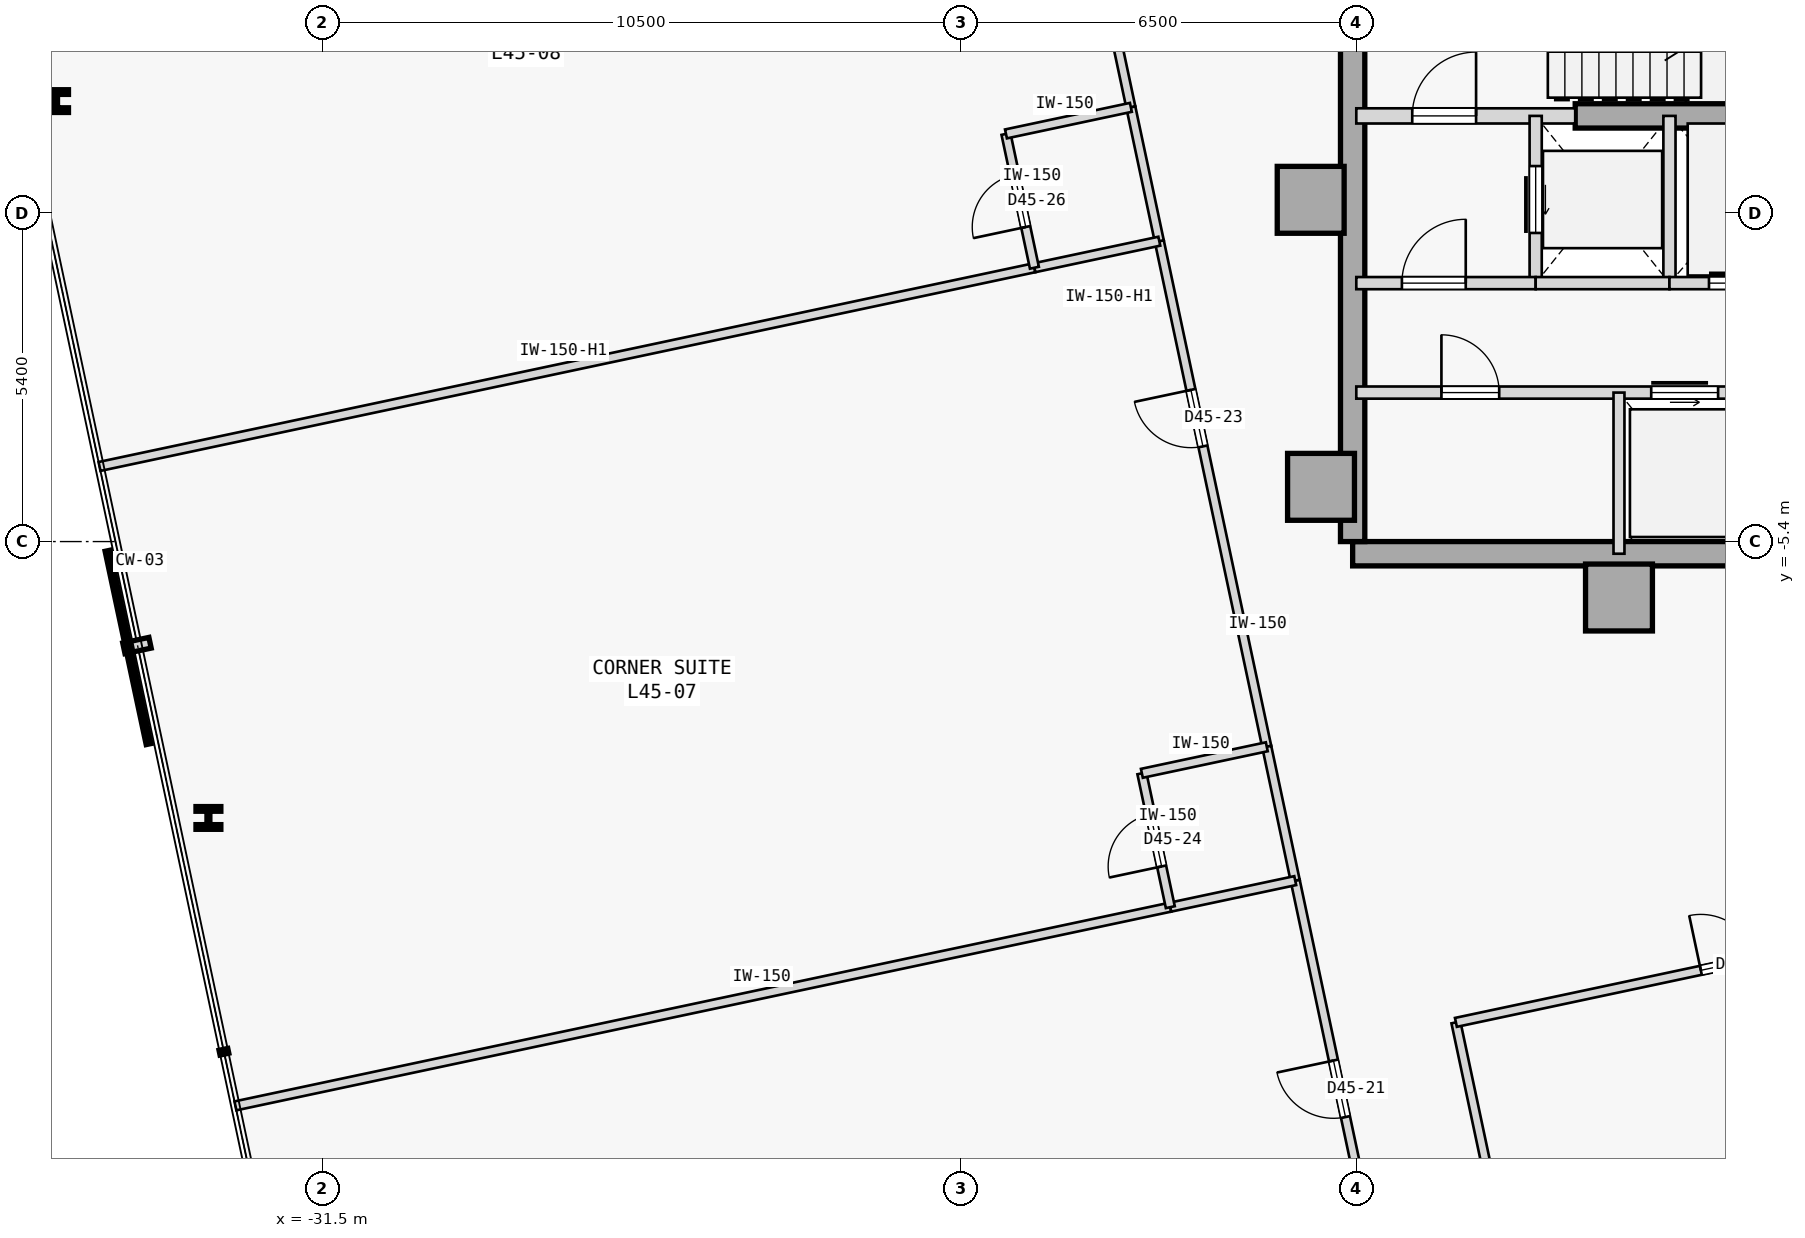
"""IFC4 building model, lengths in metres.
Left out: names, types, materials, properties, quantities, classifications, styles, units other than length and angle.
Written with IfcOpenShell. Run it as: python <this file> out.ifc"""

import sys

from ifc_helpers import new_model, si_unit, direction, frame, frame_2d, origin, origin_2d, place, context, subcontext, project, spatial, rectangle, i_section, extrude, element, fill, save


model = new_model("IFC4")
c1 = context("Model", 3, precision=1e-05, world=origin(), true_north=direction((0.0, 1.0)))
c2 = subcontext(c1, "Body", "Model", "MODEL_VIEW")
j1 = project(units=[si_unit("LENGTHUNIT", "METRE"), si_unit("PLANEANGLEUNIT", "RADIAN")], contexts=[c1])
p1 = place(None, origin())
s1 = spatial("IfcSite", under=j1, at=p1, CompositionType="ELEMENT")
p2 = place(p1, origin())
s2 = spatial("IfcBuilding", under=s1, at=p2, CompositionType="ELEMENT")
p3 = place(p2, frame((0.0, 0.0, 175.2)))
s3 = spatial("IfcBuildingStorey", under=s2, at=p3, CompositionType="ELEMENT", Elevation=175.2)
for number, where, z_axis, x_axis in (
    (1, (-15.25, 0.22, 0.0), (0.0, 0.0, 1.0), (1.0, 0.0, 0.0)),
    (2, (-15.08, -4.5, 0.0), (0.0, 0.0, 1.0), (1.0, 0.0, 0.0)),
    (3, (-10.18, -6.32, 0.0), (0.0, 0.0, 1.0), (1.0, 0.0, 0.0)),
):
    element("IfcColumn", number, at=place(p3, frame(where, z_axis=z_axis, x_axis=x_axis)), inside=s3, PredefinedType="COLUMN", context=c2, shape_type="SweptSolid", body=[
        extrude(rectangle(XDim=1.1, YDim=1.1, at=origin_2d()), origin(), (0.0, 0.0, 1.0), 3.4),
    ])
p4 = place(p3, frame((-14.56, -5.6, 0.0), z_axis=(0.0, 0.0, 1.0), x_axis=(1.0, 0.0, 0.0)))
e4 = element("IfcWall", 4, at=p4, inside=s3, PredefinedType="SHEAR", context=c2, shape_type="SweptSolid", body=[
    extrude(rectangle(XDim=10.86, YDim=0.4, at=frame_2d((5.43, 0.0))), origin(), (0.0, 0.0, 1.0), 3.175),
])
p5 = place(p3, frame((-14.56, -5.4, 0.0), z_axis=(0.0, 0.0, 1.0), x_axis=(0.0, 1.0, 0.0)))
e5 = element("IfcWall", 5, at=p5, inside=s3, PredefinedType="SHEAR", context=c2, shape_type="SweptSolid", body=[
    extrude(rectangle(XDim=10.8, YDim=0.4, at=frame_2d((5.4, 0.0))), origin(), (0.0, 0.0, 1.0), 3.175),
])
p6 = place(p3, frame((-10.9, 1.6, 0.0), z_axis=(0.0, 0.0, 1.0), x_axis=(1.0, 0.0, 0.0)))
e6 = element("IfcWall", 6, at=p6, inside=s3, PredefinedType="SHEAR", context=c2, shape_type="SweptSolid", body=[
    extrude(rectangle(XDim=5.15, YDim=0.4, at=frame_2d((2.575, 0.0))), origin(), (0.0, 0.0, 1.0), 3.175),
])
for number, where, z_axis, x_axis in (
    (7, (-35.883, 1.844, 0.0), (0.0, 0.0, 1.0), (1.0, 0.0, 0.0)),
    (8, (-33.377, -9.945, 0.0), (0.0, 0.0, 1.0), (1.0, 0.0, 0.0)),
):
    element("IfcColumn", number, at=place(p3, frame(where, z_axis=z_axis, x_axis=x_axis)), inside=s3, PredefinedType="COLUMN", context=c2, shape_type="SweptSolid", body=[
        extrude(i_section(OverallWidth=0.409, OverallDepth=0.374, WebThickness=0.048, FlangeThickness=0.077, FilletRadius=0.015, at=origin_2d()), origin(), (0.0, 0.0, 1.0), 3.4),
    ])
p7 = place(p3, frame((-14.5, 1.6, 0.0), z_axis=(0.0, 0.0, 1.0), x_axis=(1.0, 0.0, 0.0)))
e9 = element("IfcWall", 9, at=p7, inside=s3, PredefinedType="STANDARD", context=c2, shape_type="SweptSolid", body=[
    extrude(rectangle(XDim=3.6, YDim=0.25, at=frame_2d((1.8, 0.0))), origin(), (0.0, 0.0, 1.0), 3.175),
])
p8 = place(p7, frame((0.92, 0.0, 0.0)))
e10 = element("IfcOpeningElement", 10, at=p8, cuts=e9, PredefinedType="OPENING", context=c2, shape_type="SweptSolid", body=[
    extrude(rectangle(XDim=1.05, YDim=2.15, at=frame_2d((0.525, 1.075))), frame((0.0, 0.135, 0.0), z_axis=(0.0, -1.0, 0.0), x_axis=(1.0, 0.0, 0.0)), (0.0, 0.0, 1.0), 0.27),
])
p9 = place(p3, frame((-11.55, -1.15, 0.0), z_axis=(0.0, 0.0, 1.0), x_axis=(0.0, 1.0, 0.0)))
e11 = element("IfcWall", 11, at=p9, inside=s3, PredefinedType="STANDARD", context=c2, shape_type="SweptSolid", body=[
    extrude(rectangle(XDim=2.75, YDim=0.2, at=frame_2d((1.375, 0.0))), origin(), (0.0, 0.0, 1.0), 3.175),
])
p10 = place(p9, frame((0.825, 0.0, 0.0)))
e12 = element("IfcOpeningElement", 12, at=p10, cuts=e11, PredefinedType="OPENING", context=c2, shape_type="SweptSolid", body=[
    extrude(rectangle(XDim=1.1, YDim=2.15, at=frame_2d((0.55, 1.075))), frame((0.0, 0.11, 0.0), z_axis=(0.0, -1.0, 0.0), x_axis=(1.0, 0.0, 0.0)), (0.0, 0.0, 1.0), 0.22),
])
p11 = place(p3, frame((-9.35, -1.15, 0.0), z_axis=(0.0, 0.0, 1.0), x_axis=(0.0, 1.0, 0.0)))
e13 = element("IfcWall", 13, at=p11, inside=s3, PredefinedType="STANDARD", context=c2, shape_type="SweptSolid", body=[
    extrude(rectangle(XDim=2.75, YDim=0.2, at=frame_2d((1.375, 0.0))), origin(), (0.0, 0.0, 1.0), 3.175),
])
p12 = place(p3, frame((-14.5, -1.15, 0.0), z_axis=(0.0, 0.0, 1.0), x_axis=(1.0, 0.0, 0.0)))
e14 = element("IfcWall", 14, at=p12, inside=s3, PredefinedType="STANDARD", context=c2, shape_type="SweptSolid", body=[
    extrude(rectangle(XDim=2.95, YDim=0.2, at=frame_2d((1.475, 0.0))), origin(), (0.0, 0.0, 1.0), 3.175),
])
p13 = place(p12, frame((0.75, 0.0, 0.0)))
e15 = element("IfcOpeningElement", 15, at=p13, cuts=e14, PredefinedType="OPENING", context=c2, shape_type="SweptSolid", body=[
    extrude(rectangle(XDim=1.05, YDim=2.18, at=frame_2d((0.525, 1.09))), frame((0.0, 0.11, 0.0), z_axis=(0.0, -1.0, 0.0), x_axis=(1.0, 0.0, 0.0)), (0.0, 0.0, 1.0), 0.22),
])
p14 = place(p3, frame((-11.55, -1.15, 0.0), z_axis=(0.0, 0.0, 1.0), x_axis=(1.0, 0.0, 0.0)))
e16 = element("IfcWall", 16, at=p14, inside=s3, PredefinedType="STANDARD", context=c2, shape_type="SweptSolid", body=[
    extrude(rectangle(XDim=2.2, YDim=0.2, at=frame_2d((1.1, 0.0))), origin(), (0.0, 0.0, 1.0), 3.175),
])
p15 = place(p3, frame((-9.35, -1.15, 0.0), z_axis=(0.0, 0.0, 1.0), x_axis=(1.0, 0.0, 0.0)))
e17 = element("IfcWall", 17, at=p15, inside=s3, PredefinedType="STANDARD", context=c2, shape_type="SweptSolid", body=[
    extrude(rectangle(XDim=2.4, YDim=0.2, at=frame_2d((1.2, 0.0))), origin(), (0.0, 0.0, 1.0), 3.175),
])
p16 = place(p15, frame((0.65, 0.0, 0.0)))
e18 = element("IfcOpeningElement", 18, at=p16, cuts=e17, PredefinedType="OPENING", context=c2, shape_type="SweptSolid", body=[
    extrude(rectangle(XDim=1.1, YDim=2.15, at=frame_2d((0.55, 1.075))), frame((0.0, 0.11, 0.0), z_axis=(0.0, -1.0, 0.0), x_axis=(1.0, 0.0, 0.0)), (0.0, 0.0, 1.0), 0.22),
])
p17 = place(p3, frame((-14.5, -2.95, 0.0), z_axis=(0.0, 0.0, 1.0), x_axis=(1.0, 0.0, 0.0)))
e19 = element("IfcWall", 19, at=p17, inside=s3, PredefinedType="STANDARD", context=c2, shape_type="SweptSolid", body=[
    extrude(rectangle(XDim=10.8, YDim=0.2, at=frame_2d((5.4, 0.0))), origin(), (0.0, 0.0, 1.0), 3.175),
])
p18 = place(p17, frame((4.85, 0.0, 0.0)))
e20 = element("IfcOpeningElement", 20, at=p18, cuts=e19, PredefinedType="OPENING", context=c2, shape_type="SweptSolid", body=[
    extrude(rectangle(XDim=1.1, YDim=2.15, at=frame_2d((0.55, 1.075))), frame((0.0, 0.11, 0.0), z_axis=(0.0, -1.0, 0.0), x_axis=(1.0, 0.0, 0.0)), (0.0, 0.0, 1.0), 0.22),
])
p19 = place(p17, frame((7.01, 0.0, 0.0)))
e21 = element("IfcOpeningElement", 21, at=p19, cuts=e19, PredefinedType="OPENING", context=c2, shape_type="SweptSolid", body=[
    extrude(rectangle(XDim=1.1, YDim=2.15, at=frame_2d((0.55, 1.075))), frame((0.0, 0.11, 0.0), z_axis=(0.0, -1.0, 0.0), x_axis=(1.0, 0.0, 0.0)), (0.0, 0.0, 1.0), 0.22),
])
p20 = place(p17, frame((1.4, 0.0, 0.0)))
e22 = element("IfcOpeningElement", 22, at=p20, cuts=e19, PredefinedType="OPENING", context=c2, shape_type="SweptSolid", body=[
    extrude(rectangle(XDim=0.95, YDim=2.15, at=frame_2d((0.475, 1.075))), frame((0.0, 0.11, 0.0), z_axis=(0.0, -1.0, 0.0), x_axis=(1.0, 0.0, 0.0)), (0.0, 0.0, 1.0), 0.22),
])
p21 = place(p3, frame((-10.18, -5.6, 0.0), z_axis=(0.0, 0.0, 1.0), x_axis=(0.0, 1.0, 0.0)))
e23 = element("IfcWall", 23, at=p21, inside=s3, PredefinedType="STANDARD", context=c2, shape_type="SweptSolid", body=[
    extrude(rectangle(XDim=2.65, YDim=0.18, at=frame_2d((1.325, 0.0))), origin(), (0.0, 0.0, 1.0), 3.175),
])
p22 = place(p3, frame((-11.465, -19.88, 0.0), z_axis=(0.0, 0.0, 1.0), x_axis=(-0.207916109912, 0.978146661416, 0.0)))
e24 = element("IfcWall", 24, at=p22, inside=s3, PredefinedType="PARTITIONING", context=c2, shape_type="SweptSolid", body=[
    extrude(rectangle(XDim=6.72, YDim=0.15, at=frame_2d((3.36, 0.0))), origin(), (0.0, 0.0, 1.0), 3.175),
])
p23 = place(p3, frame((-12.862, -13.307, 0.0), z_axis=(0.0, 0.0, 1.0), x_axis=(0.978149904805, 0.207900850719, 0.0)))
e25 = element("IfcWall", 25, at=p23, inside=s3, PredefinedType="PARTITIONING", context=c2, shape_type="SweptSolid", body=[
    extrude(rectangle(XDim=9.156, YDim=0.15, at=frame_2d((4.578, 0.0))), origin(), (0.0, 0.0, 1.0), 3.175),
])
p24 = place(p23, frame((4.118, 0.0, 0.0)))
e26 = element("IfcOpeningElement", 26, at=p24, cuts=e25, PredefinedType="OPENING", context=c2, shape_type="SweptSolid", body=[
    extrude(rectangle(XDim=0.92, YDim=2.15, at=frame_2d((0.46, 1.075))), frame((0.0, 0.085, 0.0), z_axis=(0.0, -1.0, 0.0), x_axis=(1.0, 0.0, 0.0)), (0.0, 0.0, 1.0), 0.17),
])
p25 = place(p3, frame((-14.049, -17.823, 0.0), z_axis=(0.0, 0.0, 1.0), x_axis=(-0.207940096132, 0.978141562567, 0.0)))
e27 = element("IfcWall", 27, at=p25, inside=s3, PredefinedType="PARTITIONING", context=c2, shape_type="SweptSolid", body=[
    extrude(rectangle(XDim=7.0, YDim=0.15, at=frame_2d((3.5, 0.0))), origin(), (0.0, 0.0, 1.0), 3.175),
])
p26 = place(p25, frame((3.025, 0.0, 0.0)))
e28 = element("IfcOpeningElement", 28, at=p26, cuts=e27, PredefinedType="OPENING", context=c2, shape_type="SweptSolid", body=[
    extrude(rectangle(XDim=0.95, YDim=2.15, at=frame_2d((0.475, 1.075))), frame((0.0, 0.085, 0.0), z_axis=(0.0, -1.0, 0.0), x_axis=(1.0, 0.0, 0.0)), (0.0, 0.0, 1.0), 0.17),
])
p27 = place(p3, frame((-15.972, -8.775, 0.0), z_axis=(0.0, 0.0, 1.0), x_axis=(-0.207894825434, 0.97815118543, 0.0)))
e29 = element("IfcWall", 29, at=p27, inside=s3, PredefinedType="PARTITIONING", context=c2, shape_type="SweptSolid", body=[
    extrude(rectangle(XDim=8.5, YDim=0.15, at=frame_2d((4.25, 0.0))), origin(), (0.0, 0.0, 1.0), 3.175),
])
p28 = place(p27, frame((5.05, 0.0, 0.0)))
e30 = element("IfcOpeningElement", 30, at=p28, cuts=e29, PredefinedType="OPENING", context=c2, shape_type="SweptSolid", body=[
    extrude(rectangle(XDim=0.95, YDim=2.15, at=frame_2d((0.475, 1.075))), frame((0.0, 0.085, 0.0), z_axis=(0.0, -1.0, 0.0), x_axis=(1.0, 0.0, 0.0)), (0.0, 0.0, 1.0), 0.17),
])
p29 = place(p3, frame((-15.504, -10.976, 0.0), z_axis=(0.0, 0.0, 1.0), x_axis=(-0.207891197838, 0.978151956427, 0.0)))
e31 = element("IfcWall", 31, at=p29, inside=s3, PredefinedType="PARTITIONING", context=c2, shape_type="SweptSolid", body=[
    extrude(rectangle(XDim=2.25, YDim=0.15, at=frame_2d((1.125, 0.0))), origin(), (0.0, 0.0, 1.0), 3.175),
])
p30 = place(p3, frame((-18.207, 1.74, 0.0), z_axis=(0.0, 0.0, 1.0), x_axis=(-0.207922306475, 0.978145344246, 0.0)))
e32 = element("IfcWall", 32, at=p30, inside=s3, PredefinedType="PARTITIONING", context=c2, shape_type="SweptSolid", body=[
    extrude(rectangle(XDim=8.5, YDim=0.15, at=frame_2d((4.25, 0.0))), origin(), (0.0, 0.0, 1.0), 3.175),
])
p31 = place(p30, frame((3.775, 0.0, 0.0)))
e33 = element("IfcOpeningElement", 33, at=p31, cuts=e32, PredefinedType="OPENING", context=c2, shape_type="SweptSolid", body=[
    extrude(rectangle(XDim=0.95, YDim=2.15, at=frame_2d((0.475, 1.075))), frame((0.0, 0.085, 0.0), z_axis=(0.0, -1.0, 0.0), x_axis=(1.0, 0.0, 0.0)), (0.0, 0.0, 1.0), 0.17),
])
p32 = place(p3, frame((-17.739, -0.46, 0.0), z_axis=(0.0, 0.0, 1.0), x_axis=(-0.207891197838, 0.978151956427, 0.0)))
e34 = element("IfcWall", 34, at=p32, inside=s3, PredefinedType="PARTITIONING", context=c2, shape_type="SweptSolid", body=[
    extrude(rectangle(XDim=2.25, YDim=0.15, at=frame_2d((1.125, 0.0))), origin(), (0.0, 0.0, 1.0), 3.175),
])
p33 = place(p3, frame((-32.933, -14.68, 0.0), z_axis=(0.0, 0.0, 1.0), x_axis=(0.978146137903, 0.207918572776, 0.0)))
e35 = element("IfcWall", 35, at=p33, inside=s3, PredefinedType="PARTITIONING", context=c2, shape_type="SweptSolid", body=[
    extrude(rectangle(XDim=15.718, YDim=0.15, at=frame_2d((7.859, 0.0))), origin(), (0.0, 0.0, 1.0), 3.175),
])
p34 = place(p3, frame((-17.558, -11.412, 0.0), z_axis=(0.0, 0.0, 1.0), x_axis=(0.978153236239, 0.207885176084, 0.0)))
e36 = element("IfcWall", 36, at=p34, inside=s3, PredefinedType="PARTITIONING", context=c2, shape_type="SweptSolid", body=[
    extrude(rectangle(XDim=2.1, YDim=0.15, at=frame_2d((1.05, 0.0))), origin(), (0.0, 0.0, 1.0), 3.175),
])
p35 = place(p3, frame((-17.558, -11.412, 0.0), z_axis=(0.0, 0.0, 1.0), x_axis=(-0.207891197838, 0.978151956427, 0.0)))
e37 = element("IfcWall", 37, at=p35, inside=s3, PredefinedType="PARTITIONING", context=c2, shape_type="SweptSolid", body=[
    extrude(rectangle(XDim=2.25, YDim=0.15, at=frame_2d((1.125, 0.0))), origin(), (0.0, 0.0, 1.0), 3.175),
])
p36 = place(p35, frame((0.685, 0.0, 0.0)))
e38 = element("IfcOpeningElement", 38, at=p36, cuts=e37, PredefinedType="OPENING", context=c2, shape_type="SweptSolid", body=[
    extrude(rectangle(XDim=0.88, YDim=2.15, at=frame_2d((0.44, 1.075))), frame((0.0, 0.085, 0.0), z_axis=(0.0, -1.0, 0.0), x_axis=(1.0, 0.0, 0.0)), (0.0, 0.0, 1.0), 0.17),
])
p37 = place(p3, frame((-18.026, -9.211, 0.0), z_axis=(0.0, 0.0, 1.0), x_axis=(0.978153236239, 0.207885176084, 0.0)))
e39 = element("IfcWall", 39, at=p37, inside=s3, PredefinedType="PARTITIONING", context=c2, shape_type="SweptSolid", body=[
    extrude(rectangle(XDim=2.1, YDim=0.15, at=frame_2d((1.05, 0.0))), origin(), (0.0, 0.0, 1.0), 3.175),
])
p38 = place(p3, frame((-35.168, -4.165, 0.0), z_axis=(0.0, 0.0, 1.0), x_axis=(0.978149296727, 0.207903711638, 0.0)))
e40 = element("IfcWall", 40, at=p38, inside=s3, PredefinedType="PARTITIONING", context=c2, shape_type="SweptSolid", body=[
    extrude(rectangle(XDim=15.718, YDim=0.15, at=frame_2d((7.859, 0.0))), origin(), (0.0, 0.0, 1.0), 2.725),
])
p39 = place(p3, frame((-19.793, -0.897, 0.0), z_axis=(0.0, 0.0, 1.0), x_axis=(0.978134617382, 0.207972763311, 0.0)))
e41 = element("IfcWall", 41, at=p39, inside=s3, PredefinedType="PARTITIONING", context=c2, shape_type="SweptSolid", body=[
    extrude(rectangle(XDim=2.1, YDim=0.15, at=frame_2d((1.05, 0.0))), origin(), (0.0, 0.0, 1.0), 2.725),
])
p40 = place(p3, frame((-19.793, -0.897, 0.0), z_axis=(0.0, 0.0, 1.0), x_axis=(-0.207891197838, 0.978151956427, 0.0)))
e42 = element("IfcWall", 42, at=p40, inside=s3, PredefinedType="PARTITIONING", context=c2, shape_type="SweptSolid", body=[
    extrude(rectangle(XDim=2.25, YDim=0.15, at=frame_2d((1.125, 0.0))), origin(), (0.0, 0.0, 1.0), 3.175),
])
p41 = place(p40, frame((0.685, 0.0, 0.0)))
e43 = element("IfcOpeningElement", 43, at=p41, cuts=e42, PredefinedType="OPENING", context=c2, shape_type="SweptSolid", body=[
    extrude(rectangle(XDim=0.88, YDim=2.15, at=frame_2d((0.44, 1.075))), frame((0.0, 0.085, 0.0), z_axis=(0.0, -1.0, 0.0), x_axis=(1.0, 0.0, 0.0)), (0.0, 0.0, 1.0), 0.17),
])
p42 = place(p3, frame((-20.261, 1.304, 0.0), z_axis=(0.0, 0.0, 1.0), x_axis=(0.978134617382, 0.207972763311, 0.0)))
e44 = element("IfcWall", 44, at=p42, inside=s3, PredefinedType="PARTITIONING", context=c2, shape_type="SweptSolid", body=[
    extrude(rectangle(XDim=2.1, YDim=0.15, at=frame_2d((1.05, 0.0))), origin(), (0.0, 0.0, 1.0), 3.175),
])
p43 = place(p8, origin())
e45 = element("IfcDoor", 45, at=p43, inside=s3, OperationType="SINGLE_SWING_RIGHT", PredefinedType="DOOR", context=c2, shape_type="SweptSolid", body=[
    extrude(rectangle(XDim=1.05, YDim=2.15, at=frame_2d((0.525, 1.075))), frame((0.0, 0.025, 0.0), z_axis=(0.0, -1.0, 0.0), x_axis=(1.0, 0.0, 0.0)), (0.0, 0.0, 1.0), 0.05),
])
fill(e10, e45)
p44 = place(p13, origin())
e46 = element("IfcDoor", 46, at=p44, inside=s3, OperationType="SINGLE_SWING_RIGHT", PredefinedType="DOOR", context=c2, shape_type="SweptSolid", body=[
    extrude(rectangle(XDim=1.05, YDim=2.18, at=frame_2d((0.525, 1.09))), frame((0.0, 0.025, 0.0), z_axis=(0.0, -1.0, 0.0), x_axis=(1.0, 0.0, 0.0)), (0.0, 0.0, 1.0), 0.05),
])
fill(e15, e46)
p45 = place(p10, origin())
e47 = element("IfcDoor", 47, at=p45, inside=s3, OperationType="SLIDING_TO_RIGHT", PredefinedType="DOOR", context=c2, shape_type="SweptSolid", body=[
    extrude(rectangle(XDim=1.1, YDim=2.15, at=frame_2d((0.55, 1.075))), frame((0.0, 0.025, 0.0), z_axis=(0.0, -1.0, 0.0), x_axis=(1.0, 0.0, 0.0)), (0.0, 0.0, 1.0), 0.05),
])
fill(e12, e47)
p46 = place(p16, origin())
e48 = element("IfcDoor", 48, at=p46, inside=s3, OperationType="SLIDING_TO_RIGHT", PredefinedType="DOOR", context=c2, shape_type="SweptSolid", body=[
    extrude(rectangle(XDim=1.1, YDim=2.15, at=frame_2d((0.55, 1.075))), frame((0.0, 0.025, 0.0), z_axis=(0.0, -1.0, 0.0), x_axis=(1.0, 0.0, 0.0)), (0.0, 0.0, 1.0), 0.05),
])
fill(e18, e48)
p47 = place(p18, origin())
e49 = element("IfcDoor", 49, at=p47, inside=s3, OperationType="SLIDING_TO_LEFT", PredefinedType="DOOR", context=c2, shape_type="SweptSolid", body=[
    extrude(rectangle(XDim=1.1, YDim=2.15, at=frame_2d((0.55, 1.075))), frame((0.0, 0.025, 0.0), z_axis=(0.0, -1.0, 0.0), x_axis=(1.0, 0.0, 0.0)), (0.0, 0.0, 1.0), 0.05),
])
fill(e20, e49)
p48 = place(p20, origin())
e50 = element("IfcDoor", 50, at=p48, inside=s3, OperationType="SINGLE_SWING_LEFT", PredefinedType="DOOR", context=c2, shape_type="SweptSolid", body=[
    extrude(rectangle(XDim=0.95, YDim=2.15, at=frame_2d((0.475, 1.075))), frame((0.0, 0.025, 0.0), z_axis=(0.0, -1.0, 0.0), x_axis=(1.0, 0.0, 0.0)), (0.0, 0.0, 1.0), 0.05),
])
fill(e22, e50)
p49 = place(p24, origin())
e51 = element("IfcDoor", 51, at=p49, inside=s3, OperationType="SINGLE_SWING_LEFT", PredefinedType="DOOR", context=c2, shape_type="SweptSolid", body=[
    extrude(rectangle(XDim=0.92, YDim=2.15, at=frame_2d((0.46, 1.075))), frame((0.0, 0.025, 0.0), z_axis=(0.0, -1.0, 0.0), x_axis=(1.0, 0.0, 0.0)), (0.0, 0.0, 1.0), 0.05),
])
fill(e26, e51)
p50 = place(p26, origin())
e52 = element("IfcDoor", 52, at=p50, inside=s3, OperationType="SINGLE_SWING_RIGHT", PredefinedType="DOOR", context=c2, shape_type="SweptSolid", body=[
    extrude(rectangle(XDim=0.95, YDim=2.15, at=frame_2d((0.475, 1.075))), frame((0.0, 0.025, 0.0), z_axis=(0.0, -1.0, 0.0), x_axis=(1.0, 0.0, 0.0)), (0.0, 0.0, 1.0), 0.05),
])
fill(e28, e52)
p51 = place(p28, origin())
e53 = element("IfcDoor", 53, at=p51, inside=s3, OperationType="SINGLE_SWING_RIGHT", PredefinedType="DOOR", context=c2, shape_type="SweptSolid", body=[
    extrude(rectangle(XDim=0.95, YDim=2.15, at=frame_2d((0.475, 1.075))), frame((0.0, 0.025, 0.0), z_axis=(0.0, -1.0, 0.0), x_axis=(1.0, 0.0, 0.0)), (0.0, 0.0, 1.0), 0.05),
])
fill(e30, e53)
p52 = place(p36, origin())
e54 = element("IfcDoor", 54, at=p52, inside=s3, OperationType="SINGLE_SWING_LEFT", PredefinedType="DOOR", context=c2, shape_type="SweptSolid", body=[
    extrude(rectangle(XDim=0.88, YDim=2.15, at=frame_2d((0.44, 1.075))), frame((0.0, 0.025, 0.0), z_axis=(0.0, -1.0, 0.0), x_axis=(1.0, 0.0, 0.0)), (0.0, 0.0, 1.0), 0.05),
])
fill(e38, e54)
p53 = place(p41, origin())
e55 = element("IfcDoor", 55, at=p53, inside=s3, OperationType="SINGLE_SWING_LEFT", PredefinedType="DOOR", context=c2, shape_type="SweptSolid", body=[
    extrude(rectangle(XDim=0.88, YDim=2.15, at=frame_2d((0.44, 1.075))), frame((0.0, 0.025, 0.0), z_axis=(0.0, -1.0, 0.0), x_axis=(1.0, 0.0, 0.0)), (0.0, 0.0, 1.0), 0.05),
])
fill(e43, e55)
save(model, sys.argv[1])
